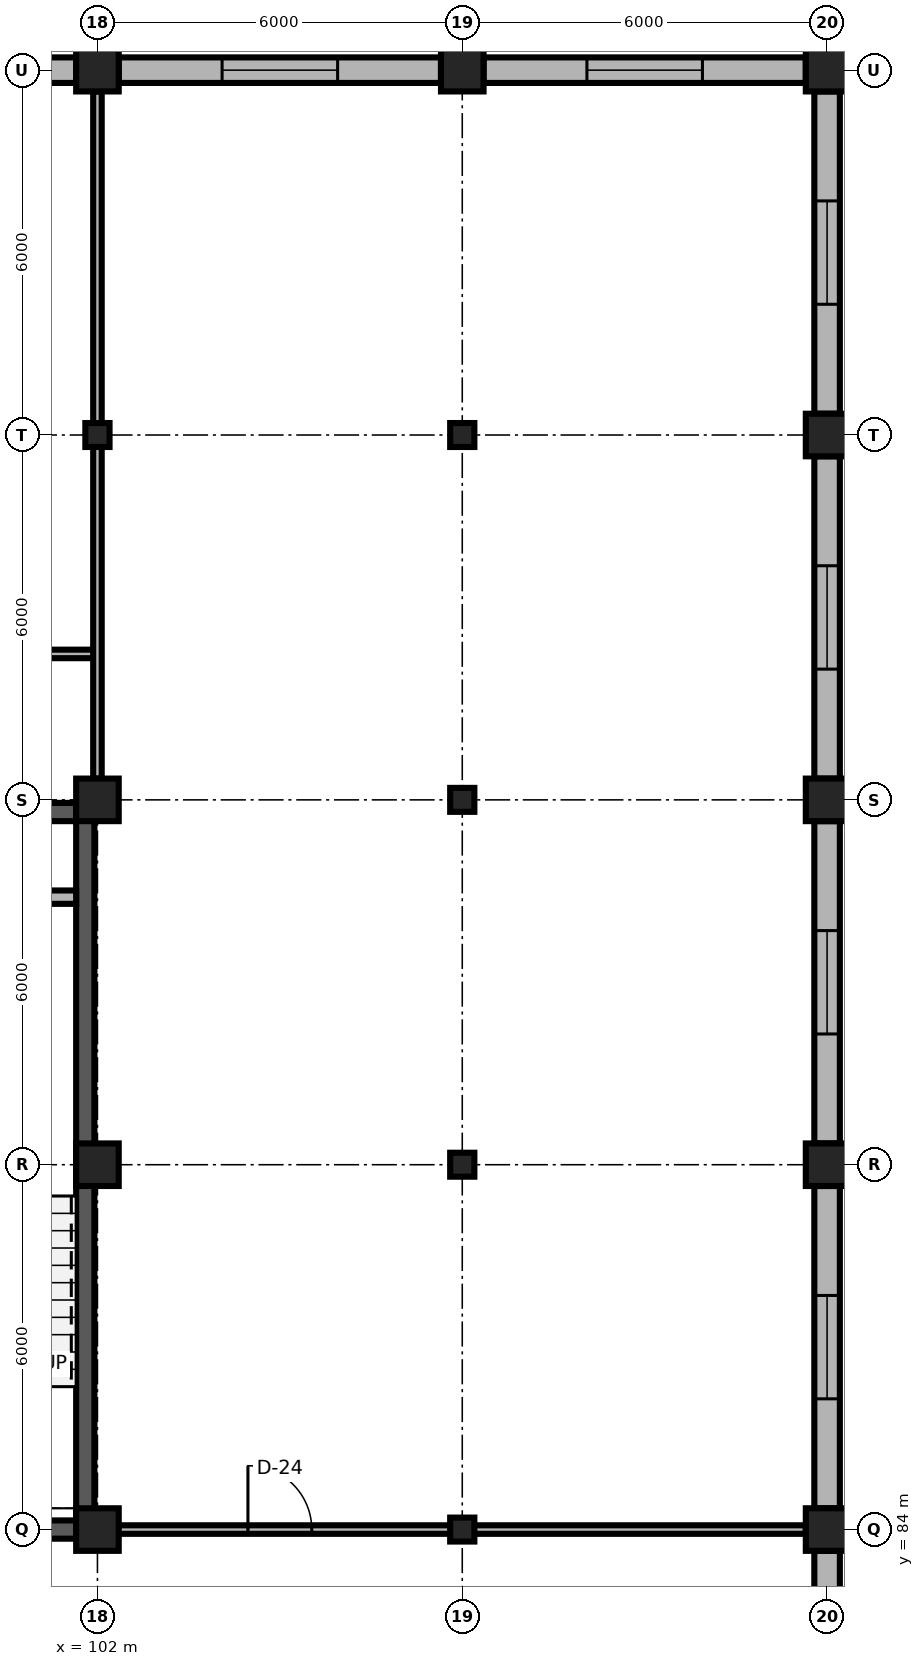
"""IFC4 building model, lengths in metres.
Left out: names, types, materials, properties, quantities, classifications, styles, units other than length and angle.
Written with IfcOpenShell. Run it as: python <this file> out.ifc"""

import sys

from ifc_helpers import new_model, si_unit, direction, frame, frame_2d, origin, origin_2d, place, context, subcontext, project, spatial, rectangle, i_section, extrude, element, fill, save


model = new_model("IFC4")
c1 = context("Model", 3, precision=1e-05, world=origin(), true_north=direction((0.0, 1.0)))
c2 = subcontext(c1, "Body", "Model", "MODEL_VIEW")
j1 = project(units=[si_unit("LENGTHUNIT", "METRE"), si_unit("PLANEANGLEUNIT", "RADIAN")], contexts=[c1])
p1 = place(None, origin())
s1 = spatial("IfcSite", under=j1, at=p1, CompositionType="ELEMENT")
p2 = place(p1, origin())
s2 = spatial("IfcBuilding", under=s1, at=p2, CompositionType="ELEMENT")
p3 = place(p2, frame((0.0, 0.0, 28.8)))
s3 = spatial("IfcBuildingStorey", under=s2, at=p3, CompositionType="ELEMENT", Elevation=28.8)
p4 = place(p3, frame((102.0, 84.0, 0.0), z_axis=(0.0, 0.0, 1.0), x_axis=(1.0, 0.0, 0.0)))
e1 = element("IfcColumn", 1, at=p4, inside=s3, PredefinedType="COLUMN", context=c2, shape_type="SweptSolid", body=[
    extrude(rectangle(XDim=0.7, YDim=0.7, at=origin_2d()), origin(), (0.0, 0.0, 1.0), 3.9),
])
p5 = place(p3, frame((108.0, 84.0, 0.0), z_axis=(0.0, 0.0, 1.0), x_axis=(1.0, 0.0, 0.0)))
e2 = element("IfcColumn", 2, at=p5, inside=s3, PredefinedType="COLUMN", context=c2, shape_type="SweptSolid", body=[
    extrude(i_section(OverallWidth=0.398, OverallDepth=0.394, WebThickness=0.011, FlangeThickness=0.018, FilletRadius=0.022, at=origin_2d()), origin(), (0.0, 0.0, 1.0), 3.9),
])
for number, where, z_axis, x_axis in (
    (3, (114.0, 84.0, 0.0), (0.0, 0.0, 1.0), (1.0, 0.0, 0.0)),
    (4, (102.0, 90.0, 0.0), (0.0, 0.0, 1.0), (1.0, 0.0, 0.0)),
):
    element("IfcColumn", number, at=place(p3, frame(where, z_axis=z_axis, x_axis=x_axis)), inside=s3, PredefinedType="COLUMN", context=c2, shape_type="SweptSolid", body=[
        extrude(rectangle(XDim=0.7, YDim=0.7, at=origin_2d()), origin(), (0.0, 0.0, 1.0), 3.9),
    ])
p6 = place(p3, frame((108.0, 90.0, 0.0), z_axis=(0.0, 0.0, 1.0), x_axis=(1.0, 0.0, 0.0)))
e5 = element("IfcColumn", 5, at=p6, inside=s3, PredefinedType="COLUMN", context=c2, shape_type="SweptSolid", body=[
    extrude(i_section(OverallWidth=0.398, OverallDepth=0.394, WebThickness=0.011, FlangeThickness=0.018, FilletRadius=0.022, at=origin_2d()), origin(), (0.0, 0.0, 1.0), 3.9),
])
for number, where, z_axis, x_axis in (
    (6, (114.0, 90.0, 0.0), (0.0, 0.0, 1.0), (1.0, 0.0, 0.0)),
    (7, (102.0, 96.0, 0.0), (0.0, 0.0, 1.0), (1.0, 0.0, 0.0)),
):
    element("IfcColumn", number, at=place(p3, frame(where, z_axis=z_axis, x_axis=x_axis)), inside=s3, PredefinedType="COLUMN", context=c2, shape_type="SweptSolid", body=[
        extrude(rectangle(XDim=0.7, YDim=0.7, at=origin_2d()), origin(), (0.0, 0.0, 1.0), 3.9),
    ])
p7 = place(p3, frame((108.0, 96.0, 0.0), z_axis=(0.0, 0.0, 1.0), x_axis=(1.0, 0.0, 0.0)))
e8 = element("IfcColumn", 8, at=p7, inside=s3, PredefinedType="COLUMN", context=c2, shape_type="SweptSolid", body=[
    extrude(i_section(OverallWidth=0.398, OverallDepth=0.394, WebThickness=0.011, FlangeThickness=0.018, FilletRadius=0.022, at=origin_2d()), origin(), (0.0, 0.0, 1.0), 3.9),
])
p8 = place(p3, frame((114.0, 96.0, 0.0), z_axis=(0.0, 0.0, 1.0), x_axis=(1.0, 0.0, 0.0)))
e9 = element("IfcColumn", 9, at=p8, inside=s3, PredefinedType="COLUMN", context=c2, shape_type="SweptSolid", body=[
    extrude(rectangle(XDim=0.7, YDim=0.7, at=origin_2d()), origin(), (0.0, 0.0, 1.0), 3.9),
])
for number, where, z_axis, x_axis in (
    (10, (102.0, 102.0, 0.0), (0.0, 0.0, 1.0), (1.0, 0.0, 0.0)),
    (11, (108.0, 102.0, 0.0), (0.0, 0.0, 1.0), (1.0, 0.0, 0.0)),
):
    element("IfcColumn", number, at=place(p3, frame(where, z_axis=z_axis, x_axis=x_axis)), inside=s3, PredefinedType="COLUMN", context=c2, shape_type="SweptSolid", body=[
        extrude(i_section(OverallWidth=0.398, OverallDepth=0.394, WebThickness=0.011, FlangeThickness=0.018, FilletRadius=0.022, at=origin_2d()), origin(), (0.0, 0.0, 1.0), 3.9),
    ])
for number, where, z_axis, x_axis in (
    (12, (114.0, 102.0, 0.0), (0.0, 0.0, 1.0), (1.0, 0.0, 0.0)),
    (13, (102.0, 108.0, 0.0), (0.0, 0.0, 1.0), (1.0, 0.0, 0.0)),
    (14, (108.0, 108.0, 0.0), (0.0, 0.0, 1.0), (1.0, 0.0, 0.0)),
    (15, (114.0, 108.0, 0.0), (0.0, 0.0, 1.0), (1.0, 0.0, 0.0)),
):
    element("IfcColumn", number, at=place(p3, frame(where, z_axis=z_axis, x_axis=x_axis)), inside=s3, PredefinedType="COLUMN", context=c2, shape_type="SweptSolid", body=[
        extrude(rectangle(XDim=0.7, YDim=0.7, at=origin_2d()), origin(), (0.0, 0.0, 1.0), 3.9),
    ])
p9 = place(p3, frame((96.35, 108.0, 0.0), z_axis=(0.0, 0.0, 1.0), x_axis=(1.0, 0.0, 0.0)))
e16 = element("IfcWall", 16, at=p9, inside=s3, PredefinedType="SOLIDWALL", context=c2, shape_type="SweptSolid", body=[
    extrude(rectangle(XDim=5.3, YDim=0.42, at=frame_2d((2.65, 0.0))), origin(), (0.0, 0.0, 1.0), 3.32),
])
p10 = place(p9, frame((1.7, 0.0, 0.85)))
e17 = element("IfcOpeningElement", 17, at=p10, cuts=e16, PredefinedType="OPENING", context=c2, shape_type="SweptSolid", body=[
    extrude(rectangle(XDim=1.9, YDim=2.1, at=frame_2d((0.95, 1.05))), frame((0.0, 0.225, 0.0), z_axis=(0.0, -1.0, 0.0), x_axis=(1.0, 0.0, 0.0)), (0.0, 0.0, 1.0), 0.45),
])
p11 = place(p3, frame((102.35, 108.0, 0.0), z_axis=(0.0, 0.0, 1.0), x_axis=(1.0, 0.0, 0.0)))
e18 = element("IfcWall", 18, at=p11, inside=s3, PredefinedType="SOLIDWALL", context=c2, shape_type="SweptSolid", body=[
    extrude(rectangle(XDim=5.3, YDim=0.42, at=frame_2d((2.65, 0.0))), origin(), (0.0, 0.0, 1.0), 3.32),
])
p12 = place(p11, frame((1.7, 0.0, 0.85)))
e19 = element("IfcOpeningElement", 19, at=p12, cuts=e18, PredefinedType="OPENING", context=c2, shape_type="SweptSolid", body=[
    extrude(rectangle(XDim=1.9, YDim=2.1, at=frame_2d((0.95, 1.05))), frame((0.0, 0.225, 0.0), z_axis=(0.0, -1.0, 0.0), x_axis=(1.0, 0.0, 0.0)), (0.0, 0.0, 1.0), 0.45),
])
p13 = place(p3, frame((108.35, 108.0, 0.0), z_axis=(0.0, 0.0, 1.0), x_axis=(1.0, 0.0, 0.0)))
e20 = element("IfcWall", 20, at=p13, inside=s3, PredefinedType="SOLIDWALL", context=c2, shape_type="SweptSolid", body=[
    extrude(rectangle(XDim=5.3, YDim=0.42, at=frame_2d((2.65, 0.0))), origin(), (0.0, 0.0, 1.0), 3.32),
])
p14 = place(p13, frame((1.7, 0.0, 0.85)))
e21 = element("IfcOpeningElement", 21, at=p14, cuts=e20, PredefinedType="OPENING", context=c2, shape_type="SweptSolid", body=[
    extrude(rectangle(XDim=1.9, YDim=2.1, at=frame_2d((0.95, 1.05))), frame((0.0, 0.225, 0.0), z_axis=(0.0, -1.0, 0.0), x_axis=(1.0, 0.0, 0.0)), (0.0, 0.0, 1.0), 0.45),
])
p15 = place(p3, frame((114.0, 78.35, 0.0), z_axis=(0.0, 0.0, 1.0), x_axis=(0.0, 1.0, 0.0)))
e22 = element("IfcWall", 22, at=p15, inside=s3, PredefinedType="SOLIDWALL", context=c2, shape_type="SweptSolid", body=[
    extrude(rectangle(XDim=5.3, YDim=0.42, at=frame_2d((2.65, 0.0))), origin(), (0.0, 0.0, 1.0), 3.32),
])
p16 = place(p15, frame((1.8, 0.0, 0.85)))
e23 = element("IfcOpeningElement", 23, at=p16, cuts=e22, PredefinedType="OPENING", context=c2, shape_type="SweptSolid", body=[
    extrude(rectangle(XDim=1.7, YDim=2.05, at=frame_2d((0.85, 1.025))), frame((0.0, 0.225, 0.0), z_axis=(0.0, -1.0, 0.0), x_axis=(1.0, 0.0, 0.0)), (0.0, 0.0, 1.0), 0.45),
])
p17 = place(p3, frame((114.0, 84.35, 0.0), z_axis=(0.0, 0.0, 1.0), x_axis=(0.0, 1.0, 0.0)))
e24 = element("IfcWall", 24, at=p17, inside=s3, PredefinedType="SOLIDWALL", context=c2, shape_type="SweptSolid", body=[
    extrude(rectangle(XDim=5.3, YDim=0.42, at=frame_2d((2.65, 0.0))), origin(), (0.0, 0.0, 1.0), 3.32),
])
p18 = place(p17, frame((1.8, 0.0, 0.85)))
e25 = element("IfcOpeningElement", 25, at=p18, cuts=e24, PredefinedType="OPENING", context=c2, shape_type="SweptSolid", body=[
    extrude(rectangle(XDim=1.7, YDim=2.05, at=frame_2d((0.85, 1.025))), frame((0.0, 0.225, 0.0), z_axis=(0.0, -1.0, 0.0), x_axis=(1.0, 0.0, 0.0)), (0.0, 0.0, 1.0), 0.45),
])
p19 = place(p3, frame((114.0, 90.35, 0.0), z_axis=(0.0, 0.0, 1.0), x_axis=(0.0, 1.0, 0.0)))
e26 = element("IfcWall", 26, at=p19, inside=s3, PredefinedType="SOLIDWALL", context=c2, shape_type="SweptSolid", body=[
    extrude(rectangle(XDim=5.3, YDim=0.42, at=frame_2d((2.65, 0.0))), origin(), (0.0, 0.0, 1.0), 3.32),
])
p20 = place(p19, frame((1.8, 0.0, 0.85)))
e27 = element("IfcOpeningElement", 27, at=p20, cuts=e26, PredefinedType="OPENING", context=c2, shape_type="SweptSolid", body=[
    extrude(rectangle(XDim=1.7, YDim=2.05, at=frame_2d((0.85, 1.025))), frame((0.0, 0.225, 0.0), z_axis=(0.0, -1.0, 0.0), x_axis=(1.0, 0.0, 0.0)), (0.0, 0.0, 1.0), 0.45),
])
p21 = place(p3, frame((114.0, 96.35, 0.0), z_axis=(0.0, 0.0, 1.0), x_axis=(0.0, 1.0, 0.0)))
e28 = element("IfcWall", 28, at=p21, inside=s3, PredefinedType="SOLIDWALL", context=c2, shape_type="SweptSolid", body=[
    extrude(rectangle(XDim=5.3, YDim=0.42, at=frame_2d((2.65, 0.0))), origin(), (0.0, 0.0, 1.0), 3.32),
])
p22 = place(p21, frame((1.8, 0.0, 0.85)))
e29 = element("IfcOpeningElement", 29, at=p22, cuts=e28, PredefinedType="OPENING", context=c2, shape_type="SweptSolid", body=[
    extrude(rectangle(XDim=1.7, YDim=2.05, at=frame_2d((0.85, 1.025))), frame((0.0, 0.225, 0.0), z_axis=(0.0, -1.0, 0.0), x_axis=(1.0, 0.0, 0.0)), (0.0, 0.0, 1.0), 0.45),
])
p23 = place(p3, frame((114.0, 102.35, 0.0), z_axis=(0.0, 0.0, 1.0), x_axis=(0.0, 1.0, 0.0)))
e30 = element("IfcWall", 30, at=p23, inside=s3, PredefinedType="SOLIDWALL", context=c2, shape_type="SweptSolid", body=[
    extrude(rectangle(XDim=5.3, YDim=0.42, at=frame_2d((2.65, 0.0))), origin(), (0.0, 0.0, 1.0), 3.32),
])
p24 = place(p23, frame((1.8, 0.0, 0.85)))
e31 = element("IfcOpeningElement", 31, at=p24, cuts=e30, PredefinedType="OPENING", context=c2, shape_type="SweptSolid", body=[
    extrude(rectangle(XDim=1.7, YDim=2.05, at=frame_2d((0.85, 1.025))), frame((0.0, 0.225, 0.0), z_axis=(0.0, -1.0, 0.0), x_axis=(1.0, 0.0, 0.0)), (0.0, 0.0, 1.0), 0.45),
])
p25 = place(p3, frame((96.35, 84.0, 0.0), z_axis=(0.0, 0.0, 1.0), x_axis=(1.0, 0.0, 0.0)))
e32 = element("IfcWall", 32, at=p25, inside=s3, PredefinedType="SHEAR", context=c2, shape_type="SweptSolid", body=[
    extrude(rectangle(XDim=5.3, YDim=0.3, at=frame_2d((2.65, 0.0))), origin(), (0.0, 0.0, 1.0), 3.66),
])
p26 = place(p25, frame((1.975, 0.0, 0.0)))
e33 = element("IfcOpeningElement", 33, at=p26, cuts=e32, PredefinedType="OPENING", context=c2, shape_type="SweptSolid", body=[
    extrude(rectangle(XDim=1.35, YDim=2.2, at=frame_2d((0.675, 1.1))), frame((0.0, 0.165, 0.0), z_axis=(0.0, -1.0, 0.0), x_axis=(1.0, 0.0, 0.0)), (0.0, 0.0, 1.0), 0.33),
])
p27 = place(p3, frame((96.35, 95.8, 0.0), z_axis=(0.0, 0.0, 1.0), x_axis=(1.0, 0.0, 0.0)))
e34 = element("IfcWall", 34, at=p27, inside=s3, PredefinedType="SHEAR", context=c2, shape_type="SweptSolid", body=[
    extrude(rectangle(XDim=5.3, YDim=0.3, at=frame_2d((2.65, 0.0))), origin(), (0.0, 0.0, 1.0), 3.74),
])
p28 = place(p3, frame((101.8, 84.0, 0.0), z_axis=(0.0, 0.0, 1.0), x_axis=(0.0, 1.0, 0.0)))
e35 = element("IfcWall", 35, at=p28, inside=s3, PredefinedType="SHEAR", context=c2, shape_type="SweptSolid", body=[
    extrude(rectangle(XDim=11.8, YDim=0.3, at=frame_2d((5.9, 0.0))), origin(), (0.0, 0.0, 1.0), 3.74),
])
p29 = place(p3, frame((100.55, 94.4, 0.0), z_axis=(0.0, 0.0, 1.0), x_axis=(1.0, 0.0, 0.0)))
e36 = element("IfcWall", 36, at=p29, inside=s3, PredefinedType="PARTITIONING", context=c2, shape_type="SweptSolid", body=[
    extrude(rectangle(XDim=1.1, YDim=0.22, at=frame_2d((0.55, 0.0))), origin(), (0.0, 0.0, 1.0), 3.74),
])
p30 = place(p3, frame((96.0, 98.4, 0.0), z_axis=(0.0, 0.0, 1.0), x_axis=(1.0, 0.0, 0.0)))
e37 = element("IfcWall", 37, at=p30, inside=s3, PredefinedType="PARTITIONING", context=c2, shape_type="SweptSolid", body=[
    extrude(rectangle(XDim=6.0, YDim=0.14, at=frame_2d((3.0, 0.0))), origin(), (0.0, 0.0, 1.0), 3.74),
])
p31 = place(p30, frame((2.54, 0.0, 0.0)))
e38 = element("IfcOpeningElement", 38, at=p31, cuts=e37, PredefinedType="OPENING", context=c2, shape_type="SweptSolid", body=[
    extrude(rectangle(XDim=0.92, YDim=2.15, at=frame_2d((0.46, 1.075))), frame((0.0, 0.085, 0.0), z_axis=(0.0, -1.0, 0.0), x_axis=(1.0, 0.0, 0.0)), (0.0, 0.0, 1.0), 0.17),
])
p32 = place(p3, frame((102.0, 84.0, 0.0), z_axis=(0.0, 0.0, 1.0), x_axis=(1.0, 0.0, 0.0)))
e39 = element("IfcWall", 39, at=p32, inside=s3, PredefinedType="PARTITIONING", context=c2, shape_type="SweptSolid", body=[
    extrude(rectangle(XDim=6.0, YDim=0.14, at=frame_2d((3.0, 0.0))), origin(), (0.0, 0.0, 1.0), 3.352),
])
p33 = place(p32, frame((2.475, 0.0, 0.0)))
e40 = element("IfcOpeningElement", 40, at=p33, cuts=e39, PredefinedType="OPENING", context=c2, shape_type="SweptSolid", body=[
    extrude(rectangle(XDim=1.05, YDim=2.25, at=frame_2d((0.525, 1.125))), frame((0.0, 0.085, 0.0), z_axis=(0.0, -1.0, 0.0), x_axis=(1.0, 0.0, 0.0)), (0.0, 0.0, 1.0), 0.17),
])
p34 = place(p3, frame((102.0, 96.35, 0.0), z_axis=(0.0, 0.0, 1.0), x_axis=(0.0, 1.0, 0.0)))
e41 = element("IfcWall", 41, at=p34, inside=s3, PredefinedType="PARTITIONING", context=c2, shape_type="SweptSolid", body=[
    extrude(rectangle(XDim=11.3, YDim=0.14, at=frame_2d((5.65, 0.0))), origin(), (0.0, 0.0, 1.0), 3.352),
])
p35 = place(p3, frame((108.0, 84.0, 0.0), z_axis=(0.0, 0.0, 1.0), x_axis=(1.0, 0.0, 0.0)))
e42 = element("IfcWall", 42, at=p35, inside=s3, PredefinedType="PARTITIONING", context=c2, shape_type="SweptSolid", body=[
    extrude(rectangle(XDim=5.65, YDim=0.14, at=frame_2d((2.825, 0.0))), origin(), (0.0, 0.0, 1.0), 3.352),
])
p36 = place(p12, origin())
e43 = element("IfcWindow", 43, at=p36, inside=s3, PartitioningType="SINGLE_PANEL", PredefinedType="WINDOW", context=c2, shape_type="SweptSolid", body=[
    extrude(rectangle(XDim=1.9, YDim=2.1, at=frame_2d((0.95, 1.05))), frame((0.0, 0.03, 0.0), z_axis=(0.0, -1.0, 0.0), x_axis=(1.0, 0.0, 0.0)), (0.0, 0.0, 1.0), 0.06),
])
fill(e19, e43)
p37 = place(p14, origin())
e44 = element("IfcWindow", 44, at=p37, inside=s3, PartitioningType="SINGLE_PANEL", PredefinedType="WINDOW", context=c2, shape_type="SweptSolid", body=[
    extrude(rectangle(XDim=1.9, YDim=2.1, at=frame_2d((0.95, 1.05))), frame((0.0, 0.03, 0.0), z_axis=(0.0, -1.0, 0.0), x_axis=(1.0, 0.0, 0.0)), (0.0, 0.0, 1.0), 0.06),
])
fill(e21, e44)
p38 = place(p18, origin())
e45 = element("IfcWindow", 45, at=p38, inside=s3, PartitioningType="SINGLE_PANEL", PredefinedType="WINDOW", context=c2, shape_type="SweptSolid", body=[
    extrude(rectangle(XDim=1.7, YDim=2.05, at=frame_2d((0.85, 1.025))), frame((0.0, 0.03, 0.0), z_axis=(0.0, -1.0, 0.0), x_axis=(1.0, 0.0, 0.0)), (0.0, 0.0, 1.0), 0.06),
])
fill(e25, e45)
p39 = place(p20, origin())
e46 = element("IfcWindow", 46, at=p39, inside=s3, PartitioningType="SINGLE_PANEL", PredefinedType="WINDOW", context=c2, shape_type="SweptSolid", body=[
    extrude(rectangle(XDim=1.7, YDim=2.05, at=frame_2d((0.85, 1.025))), frame((0.0, 0.03, 0.0), z_axis=(0.0, -1.0, 0.0), x_axis=(1.0, 0.0, 0.0)), (0.0, 0.0, 1.0), 0.06),
])
fill(e27, e46)
p40 = place(p22, origin())
e47 = element("IfcWindow", 47, at=p40, inside=s3, PartitioningType="SINGLE_PANEL", PredefinedType="WINDOW", context=c2, shape_type="SweptSolid", body=[
    extrude(rectangle(XDim=1.7, YDim=2.05, at=frame_2d((0.85, 1.025))), frame((0.0, 0.03, 0.0), z_axis=(0.0, -1.0, 0.0), x_axis=(1.0, 0.0, 0.0)), (0.0, 0.0, 1.0), 0.06),
])
fill(e29, e47)
p41 = place(p24, origin())
e48 = element("IfcWindow", 48, at=p41, inside=s3, PartitioningType="SINGLE_PANEL", PredefinedType="WINDOW", context=c2, shape_type="SweptSolid", body=[
    extrude(rectangle(XDim=1.7, YDim=2.05, at=frame_2d((0.85, 1.025))), frame((0.0, 0.03, 0.0), z_axis=(0.0, -1.0, 0.0), x_axis=(1.0, 0.0, 0.0)), (0.0, 0.0, 1.0), 0.06),
])
fill(e31, e48)
p42 = place(p33, origin())
e49 = element("IfcDoor", 49, at=p42, inside=s3, OperationType="SINGLE_SWING_LEFT", PredefinedType="DOOR", context=c2, shape_type="SweptSolid", body=[
    extrude(rectangle(XDim=1.05, YDim=2.25, at=frame_2d((0.525, 1.125))), frame((0.0, 0.025, 0.0), z_axis=(0.0, -1.0, 0.0), x_axis=(1.0, 0.0, 0.0)), (0.0, 0.0, 1.0), 0.05),
])
fill(e40, e49)
save(model, sys.argv[1])
